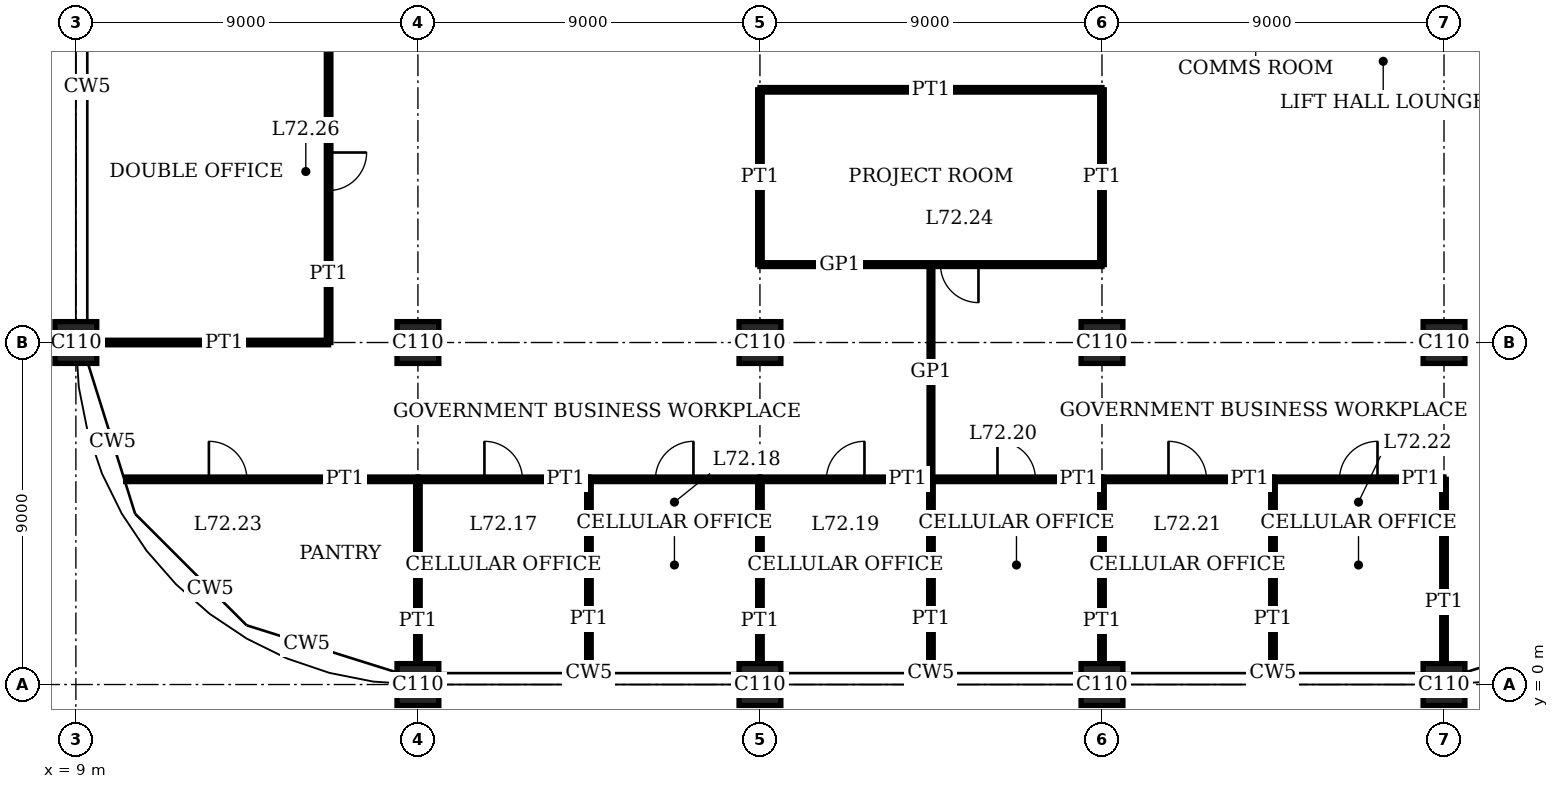
"""IFC4 building model, lengths in metres.
Left out: names, types, materials, properties, quantities, classifications, styles, units other than length and angle.
Written with IfcOpenShell. Run it as: python <this file> out.ifc"""

import sys

from ifc_helpers import new_model, si_unit, direction, frame, frame_2d, origin, origin_2d, place, context, subcontext, project, spatial, rectangle, extrude, element, fill, save


model = new_model("IFC4")
c1 = context("Model", 3, precision=1e-05, world=origin(), true_north=direction((0.0, 1.0)))
c2 = subcontext(c1, "Body", "Model", "MODEL_VIEW")
j1 = project(units=[si_unit("LENGTHUNIT", "METRE"), si_unit("PLANEANGLEUNIT", "RADIAN")], contexts=[c1])
p1 = place(None, origin())
s1 = spatial("IfcSite", under=j1, at=p1, CompositionType="ELEMENT")
p2 = place(p1, origin())
s2 = spatial("IfcBuilding", under=s1, at=p2, CompositionType="ELEMENT")
p3 = place(p2, frame((0.0, 0.0, 295.4)))
s3 = spatial("IfcBuildingStorey", under=s2, at=p3, CompositionType="ELEMENT", Elevation=295.4)
for number, where, z_axis, x_axis in (
    (1, (9.0, 9.0, 0.0), (0.0, 0.0, 1.0), (1.0, 0.0, 0.0)),
    (2, (18.0, 0.0, 0.0), (0.0, 0.0, 1.0), (1.0, 0.0, 0.0)),
    (3, (18.0, 9.0, 0.0), (0.0, 0.0, 1.0), (1.0, 0.0, 0.0)),
    (4, (27.0, 0.0, 0.0), (0.0, 0.0, 1.0), (1.0, 0.0, 0.0)),
    (5, (27.0, 9.0, 0.0), (0.0, 0.0, 1.0), (1.0, 0.0, 0.0)),
    (6, (36.0, 0.0, 0.0), (0.0, 0.0, 1.0), (1.0, 0.0, 0.0)),
    (7, (36.0, 9.0, 0.0), (0.0, 0.0, 1.0), (1.0, 0.0, 0.0)),
    (8, (45.0, 0.0, 0.0), (0.0, 0.0, 1.0), (1.0, 0.0, 0.0)),
    (9, (45.0, 9.0, 0.0), (0.0, 0.0, 1.0), (1.0, 0.0, 0.0)),
):
    element("IfcColumn", number, at=place(p3, frame(where, z_axis=z_axis, x_axis=x_axis)), inside=s3, PredefinedType="COLUMN", context=c2, shape_type="SweptSolid", body=[
        extrude(rectangle(XDim=1.1, YDim=1.1, at=origin_2d()), origin(), (0.0, 0.0, 1.0), 4.0),
    ])
p4 = place(p3, frame((18.0, 5.4, 0.0), z_axis=(0.0, 0.0, 1.0), x_axis=(1.0, 0.0, 0.0)))
e10 = element("IfcWall", 10, at=p4, inside=s3, PredefinedType="PARTITIONING", context=c2, shape_type="SweptSolid", body=[
    extrude(rectangle(XDim=4.5, YDim=0.12, at=frame_2d((2.25, 0.0))), origin(), (0.0, 0.0, 1.0), 3.75),
])
p5 = place(p4, frame((1.75, 0.0, 0.0)))
e11 = element("IfcOpeningElement", 11, at=p5, cuts=e10, PredefinedType="OPENING", context=c2, shape_type="SweptSolid", body=[
    extrude(rectangle(XDim=1.0, YDim=2.4, at=frame_2d((0.5, 1.2))), frame((0.0, 0.07, 0.0), z_axis=(0.0, -1.0, 0.0), x_axis=(1.0, 0.0, 0.0)), (0.0, 0.0, 1.0), 0.14),
])
p6 = place(p3, frame((22.5, 5.4, 0.0), z_axis=(0.0, 0.0, 1.0), x_axis=(1.0, 0.0, 0.0)))
e12 = element("IfcWall", 12, at=p6, inside=s3, PredefinedType="PARTITIONING", context=c2, shape_type="SweptSolid", body=[
    extrude(rectangle(XDim=4.5, YDim=0.12, at=frame_2d((2.25, 0.0))), origin(), (0.0, 0.0, 1.0), 3.75),
])
p7 = place(p6, frame((1.75, 0.0, 0.0)))
e13 = element("IfcOpeningElement", 13, at=p7, cuts=e12, PredefinedType="OPENING", context=c2, shape_type="SweptSolid", body=[
    extrude(rectangle(XDim=1.0, YDim=2.4, at=frame_2d((0.5, 1.2))), frame((0.0, 0.07, 0.0), z_axis=(0.0, -1.0, 0.0), x_axis=(1.0, 0.0, 0.0)), (0.0, 0.0, 1.0), 0.14),
])
p8 = place(p3, frame((27.0, 5.4, 0.0), z_axis=(0.0, 0.0, 1.0), x_axis=(1.0, 0.0, 0.0)))
e14 = element("IfcWall", 14, at=p8, inside=s3, PredefinedType="PARTITIONING", context=c2, shape_type="SweptSolid", body=[
    extrude(rectangle(XDim=4.5, YDim=0.12, at=frame_2d((2.25, 0.0))), origin(), (0.0, 0.0, 1.0), 3.75),
])
p9 = place(p8, frame((1.75, 0.0, 0.0)))
e15 = element("IfcOpeningElement", 15, at=p9, cuts=e14, PredefinedType="OPENING", context=c2, shape_type="SweptSolid", body=[
    extrude(rectangle(XDim=1.0, YDim=2.4, at=frame_2d((0.5, 1.2))), frame((0.0, 0.07, 0.0), z_axis=(0.0, -1.0, 0.0), x_axis=(1.0, 0.0, 0.0)), (0.0, 0.0, 1.0), 0.14),
])
p10 = place(p3, frame((31.5, 5.4, 0.0), z_axis=(0.0, 0.0, 1.0), x_axis=(1.0, 0.0, 0.0)))
e16 = element("IfcWall", 16, at=p10, inside=s3, PredefinedType="PARTITIONING", context=c2, shape_type="SweptSolid", body=[
    extrude(rectangle(XDim=4.5, YDim=0.12, at=frame_2d((2.25, 0.0))), origin(), (0.0, 0.0, 1.0), 3.75),
])
p11 = place(p10, frame((1.75, 0.0, 0.0)))
e17 = element("IfcOpeningElement", 17, at=p11, cuts=e16, PredefinedType="OPENING", context=c2, shape_type="SweptSolid", body=[
    extrude(rectangle(XDim=1.0, YDim=2.4, at=frame_2d((0.5, 1.2))), frame((0.0, 0.07, 0.0), z_axis=(0.0, -1.0, 0.0), x_axis=(1.0, 0.0, 0.0)), (0.0, 0.0, 1.0), 0.14),
])
p12 = place(p3, frame((36.0, 5.4, 0.0), z_axis=(0.0, 0.0, 1.0), x_axis=(1.0, 0.0, 0.0)))
e18 = element("IfcWall", 18, at=p12, inside=s3, PredefinedType="PARTITIONING", context=c2, shape_type="SweptSolid", body=[
    extrude(rectangle(XDim=4.5, YDim=0.12, at=frame_2d((2.25, 0.0))), origin(), (0.0, 0.0, 1.0), 3.75),
])
p13 = place(p12, frame((1.75, 0.0, 0.0)))
e19 = element("IfcOpeningElement", 19, at=p13, cuts=e18, PredefinedType="OPENING", context=c2, shape_type="SweptSolid", body=[
    extrude(rectangle(XDim=1.0, YDim=2.4, at=frame_2d((0.5, 1.2))), frame((0.0, 0.07, 0.0), z_axis=(0.0, -1.0, 0.0), x_axis=(1.0, 0.0, 0.0)), (0.0, 0.0, 1.0), 0.14),
])
p14 = place(p3, frame((40.5, 5.4, 0.0), z_axis=(0.0, 0.0, 1.0), x_axis=(1.0, 0.0, 0.0)))
e20 = element("IfcWall", 20, at=p14, inside=s3, PredefinedType="PARTITIONING", context=c2, shape_type="SweptSolid", body=[
    extrude(rectangle(XDim=4.5, YDim=0.12, at=frame_2d((2.25, 0.0))), origin(), (0.0, 0.0, 1.0), 3.75),
])
p15 = place(p14, frame((1.75, 0.0, 0.0)))
e21 = element("IfcOpeningElement", 21, at=p15, cuts=e20, PredefinedType="OPENING", context=c2, shape_type="SweptSolid", body=[
    extrude(rectangle(XDim=1.0, YDim=2.4, at=frame_2d((0.5, 1.2))), frame((0.0, 0.07, 0.0), z_axis=(0.0, -1.0, 0.0), x_axis=(1.0, 0.0, 0.0)), (0.0, 0.0, 1.0), 0.14),
])
p16 = place(p3, frame((10.31, 5.4, 0.0), z_axis=(0.0, 0.0, 1.0), x_axis=(1.0, 0.0, 0.0)))
e22 = element("IfcWall", 22, at=p16, inside=s3, PredefinedType="PARTITIONING", context=c2, shape_type="SweptSolid", body=[
    extrude(rectangle(XDim=7.69, YDim=0.12, at=frame_2d((3.845, 0.0))), origin(), (0.0, 0.0, 1.0), 3.75),
])
p17 = place(p16, frame((2.19, 0.0, 0.0)))
e23 = element("IfcOpeningElement", 23, at=p17, cuts=e22, PredefinedType="OPENING", context=c2, shape_type="SweptSolid", body=[
    extrude(rectangle(XDim=1.0, YDim=2.4, at=frame_2d((0.5, 1.2))), frame((0.0, 0.07, 0.0), z_axis=(0.0, -1.0, 0.0), x_axis=(1.0, 0.0, 0.0)), (0.0, 0.0, 1.0), 0.14),
])
p18 = place(p3, frame((9.55, 9.0, 0.0), z_axis=(0.0, 0.0, 1.0), x_axis=(1.0, 0.0, 0.0)))
e24 = element("IfcWall", 24, at=p18, inside=s3, PredefinedType="PARTITIONING", context=c2, shape_type="SweptSolid", body=[
    extrude(rectangle(XDim=6.1, YDim=0.12, at=frame_2d((3.05, 0.0))), origin(), (0.0, 0.0, 1.0), 3.05),
])
p19 = place(p3, frame((27.0, 11.05, 0.0), z_axis=(0.0, 0.0, 1.0), x_axis=(1.0, 0.0, 0.0)))
e25 = element("IfcWall", 25, at=p19, inside=s3, PredefinedType="PARTITIONING", context=c2, shape_type="SweptSolid", body=[
    extrude(rectangle(XDim=9.0, YDim=0.1, at=frame_2d((4.5, 0.0))), origin(), (0.0, 0.0, 1.0), 3.75),
])
p20 = place(p19, frame((4.75, 0.0, 0.0)))
e26 = element("IfcOpeningElement", 26, at=p20, cuts=e25, PredefinedType="OPENING", context=c2, shape_type="SweptSolid", body=[
    extrude(rectangle(XDim=1.0, YDim=2.4, at=frame_2d((0.5, 1.2))), frame((0.0, 0.06, 0.0), z_axis=(0.0, -1.0, 0.0), x_axis=(1.0, 0.0, 0.0)), (0.0, 0.0, 1.0), 0.12),
])
p21 = place(p3, frame((27.0, 15.65, 0.0), z_axis=(0.0, 0.0, 1.0), x_axis=(1.0, 0.0, 0.0)))
e27 = element("IfcWall", 27, at=p21, inside=s3, PredefinedType="PARTITIONING", context=c2, shape_type="SweptSolid", body=[
    extrude(rectangle(XDim=9.0, YDim=0.12, at=frame_2d((4.5, 0.0))), origin(), (0.0, 0.0, 1.0), 3.75),
])
p22 = place(p3, frame((15.65, 9.0, 0.0), z_axis=(0.0, 0.0, 1.0), x_axis=(0.0, 1.0, 0.0)))
e28 = element("IfcWall", 28, at=p22, inside=s3, PredefinedType="PARTITIONING", context=c2, shape_type="SweptSolid", body=[
    extrude(rectangle(XDim=9.0, YDim=0.12, at=frame_2d((4.5, 0.0))), origin(), (0.0, 0.0, 1.0), 3.75),
])
p23 = place(p22, frame((4.0, 0.0, 0.0)))
e29 = element("IfcOpeningElement", 29, at=p23, cuts=e28, PredefinedType="OPENING", context=c2, shape_type="SweptSolid", body=[
    extrude(rectangle(XDim=1.0, YDim=2.4, at=frame_2d((0.5, 1.2))), frame((0.0, 0.07, 0.0), z_axis=(0.0, -1.0, 0.0), x_axis=(1.0, 0.0, 0.0)), (0.0, 0.0, 1.0), 0.14),
])
p24 = place(p3, frame((18.0, 0.55, 0.0), z_axis=(0.0, 0.0, 1.0), x_axis=(0.0, 1.0, 0.0)))
e30 = element("IfcWall", 30, at=p24, inside=s3, PredefinedType="PARTITIONING", context=c2, shape_type="SweptSolid", body=[
    extrude(rectangle(XDim=4.85, YDim=0.12, at=frame_2d((2.425, 0.0))), origin(), (0.0, 0.0, 1.0), 3.05),
])
p25 = place(p3, frame((22.5, 0.31, 0.0), z_axis=(0.0, 0.0, 1.0), x_axis=(0.0, 1.0, 0.0)))
e31 = element("IfcWall", 31, at=p25, inside=s3, PredefinedType="PARTITIONING", context=c2, shape_type="SweptSolid", body=[
    extrude(rectangle(XDim=5.09, YDim=0.12, at=frame_2d((2.545, 0.0))), origin(), (0.0, 0.0, 1.0), 3.75),
])
p26 = place(p3, frame((27.0, 0.55, 0.0), z_axis=(0.0, 0.0, 1.0), x_axis=(0.0, 1.0, 0.0)))
e32 = element("IfcWall", 32, at=p26, inside=s3, PredefinedType="PARTITIONING", context=c2, shape_type="SweptSolid", body=[
    extrude(rectangle(XDim=4.85, YDim=0.12, at=frame_2d((2.425, 0.0))), origin(), (0.0, 0.0, 1.0), 3.05),
])
p27 = place(p3, frame((27.0, 11.05, 0.0), z_axis=(0.0, 0.0, 1.0), x_axis=(0.0, 1.0, 0.0)))
e33 = element("IfcWall", 33, at=p27, inside=s3, PredefinedType="PARTITIONING", context=c2, shape_type="SweptSolid", body=[
    extrude(rectangle(XDim=4.6, YDim=0.12, at=frame_2d((2.3, 0.0))), origin(), (0.0, 0.0, 1.0), 3.05),
])
p28 = place(p3, frame((31.5, 0.31, 0.0), z_axis=(0.0, 0.0, 1.0), x_axis=(0.0, 1.0, 0.0)))
e34 = element("IfcWall", 34, at=p28, inside=s3, PredefinedType="PARTITIONING", context=c2, shape_type="SweptSolid", body=[
    extrude(rectangle(XDim=5.09, YDim=0.12, at=frame_2d((2.545, 0.0))), origin(), (0.0, 0.0, 1.0), 3.75),
])
p29 = place(p3, frame((31.5, 5.4, 0.0), z_axis=(0.0, 0.0, 1.0), x_axis=(0.0, 1.0, 0.0)))
e35 = element("IfcWall", 35, at=p29, inside=s3, PredefinedType="PARTITIONING", context=c2, shape_type="SweptSolid", body=[
    extrude(rectangle(XDim=5.66, YDim=0.1, at=frame_2d((2.83, 0.0))), origin(), (0.0, 0.0, 1.0), 3.75),
])
p30 = place(p3, frame((36.0, 0.55, 0.0), z_axis=(0.0, 0.0, 1.0), x_axis=(0.0, 1.0, 0.0)))
e36 = element("IfcWall", 36, at=p30, inside=s3, PredefinedType="PARTITIONING", context=c2, shape_type="SweptSolid", body=[
    extrude(rectangle(XDim=4.85, YDim=0.12, at=frame_2d((2.425, 0.0))), origin(), (0.0, 0.0, 1.0), 3.05),
])
p31 = place(p3, frame((36.0, 11.05, 0.0), z_axis=(0.0, 0.0, 1.0), x_axis=(0.0, 1.0, 0.0)))
e37 = element("IfcWall", 37, at=p31, inside=s3, PredefinedType="PARTITIONING", context=c2, shape_type="SweptSolid", body=[
    extrude(rectangle(XDim=4.6, YDim=0.12, at=frame_2d((2.3, 0.0))), origin(), (0.0, 0.0, 1.0), 3.05),
])
p32 = place(p3, frame((40.5, 0.31, 0.0), z_axis=(0.0, 0.0, 1.0), x_axis=(0.0, 1.0, 0.0)))
e38 = element("IfcWall", 38, at=p32, inside=s3, PredefinedType="PARTITIONING", context=c2, shape_type="SweptSolid", body=[
    extrude(rectangle(XDim=5.09, YDim=0.12, at=frame_2d((2.545, 0.0))), origin(), (0.0, 0.0, 1.0), 3.75),
])
p33 = place(p3, frame((45.0, 0.55, 0.0), z_axis=(0.0, 0.0, 1.0), x_axis=(0.0, 1.0, 0.0)))
e39 = element("IfcWall", 39, at=p33, inside=s3, PredefinedType="PARTITIONING", context=c2, shape_type="SweptSolid", body=[
    extrude(rectangle(XDim=4.85, YDim=0.12, at=frame_2d((2.425, 0.0))), origin(), (0.0, 0.0, 1.0), 3.05),
])
p34 = place(p5, origin())
e40 = element("IfcDoor", 40, at=p34, inside=s3, OperationType="SINGLE_SWING_RIGHT", PredefinedType="DOOR", context=c2, shape_type="SweptSolid", body=[
    extrude(rectangle(XDim=1.0, YDim=2.4, at=frame_2d((0.5, 1.2))), frame((0.0, 0.025, 0.0), z_axis=(0.0, -1.0, 0.0), x_axis=(1.0, 0.0, 0.0)), (0.0, 0.0, 1.0), 0.05),
])
fill(e11, e40)
p35 = place(p7, origin())
e41 = element("IfcDoor", 41, at=p35, inside=s3, OperationType="SINGLE_SWING_LEFT", PredefinedType="DOOR", context=c2, shape_type="SweptSolid", body=[
    extrude(rectangle(XDim=1.0, YDim=2.4, at=frame_2d((0.5, 1.2))), frame((0.0, 0.025, 0.0), z_axis=(0.0, -1.0, 0.0), x_axis=(1.0, 0.0, 0.0)), (0.0, 0.0, 1.0), 0.05),
])
fill(e13, e41)
p36 = place(p9, origin())
e42 = element("IfcDoor", 42, at=p36, inside=s3, OperationType="SINGLE_SWING_LEFT", PredefinedType="DOOR", context=c2, shape_type="SweptSolid", body=[
    extrude(rectangle(XDim=1.0, YDim=2.4, at=frame_2d((0.5, 1.2))), frame((0.0, 0.025, 0.0), z_axis=(0.0, -1.0, 0.0), x_axis=(1.0, 0.0, 0.0)), (0.0, 0.0, 1.0), 0.05),
])
fill(e15, e42)
p37 = place(p11, origin())
e43 = element("IfcDoor", 43, at=p37, inside=s3, OperationType="SINGLE_SWING_RIGHT", PredefinedType="DOOR", context=c2, shape_type="SweptSolid", body=[
    extrude(rectangle(XDim=1.0, YDim=2.4, at=frame_2d((0.5, 1.2))), frame((0.0, 0.025, 0.0), z_axis=(0.0, -1.0, 0.0), x_axis=(1.0, 0.0, 0.0)), (0.0, 0.0, 1.0), 0.05),
])
fill(e17, e43)
p38 = place(p13, origin())
e44 = element("IfcDoor", 44, at=p38, inside=s3, OperationType="SINGLE_SWING_RIGHT", PredefinedType="DOOR", context=c2, shape_type="SweptSolid", body=[
    extrude(rectangle(XDim=1.0, YDim=2.4, at=frame_2d((0.5, 1.2))), frame((0.0, 0.025, 0.0), z_axis=(0.0, -1.0, 0.0), x_axis=(1.0, 0.0, 0.0)), (0.0, 0.0, 1.0), 0.05),
])
fill(e19, e44)
p39 = place(p15, origin())
e45 = element("IfcDoor", 45, at=p39, inside=s3, OperationType="SINGLE_SWING_LEFT", PredefinedType="DOOR", context=c2, shape_type="SweptSolid", body=[
    extrude(rectangle(XDim=1.0, YDim=2.4, at=frame_2d((0.5, 1.2))), frame((0.0, 0.025, 0.0), z_axis=(0.0, -1.0, 0.0), x_axis=(1.0, 0.0, 0.0)), (0.0, 0.0, 1.0), 0.05),
])
fill(e21, e45)
p40 = place(p17, origin())
e46 = element("IfcDoor", 46, at=p40, inside=s3, OperationType="SINGLE_SWING_RIGHT", PredefinedType="DOOR", context=c2, shape_type="SweptSolid", body=[
    extrude(rectangle(XDim=1.0, YDim=2.4, at=frame_2d((0.5, 1.2))), frame((0.0, 0.025, 0.0), z_axis=(0.0, -1.0, 0.0), x_axis=(1.0, 0.0, 0.0)), (0.0, 0.0, 1.0), 0.05),
])
fill(e23, e46)
p41 = place(p20, origin())
e47 = element("IfcDoor", 47, at=p41, inside=s3, OperationType="SINGLE_SWING_RIGHT", PredefinedType="DOOR", context=c2, shape_type="SweptSolid", body=[
    extrude(rectangle(XDim=1.0, YDim=2.4, at=frame_2d((0.5, 1.2))), frame((0.0, 0.02, 0.0), z_axis=(0.0, -1.0, 0.0), x_axis=(1.0, 0.0, 0.0)), (0.0, 0.0, 1.0), 0.04),
])
fill(e26, e47)
p42 = place(p23, origin())
e48 = element("IfcDoor", 48, at=p42, inside=s3, OperationType="SINGLE_SWING_RIGHT", PredefinedType="DOOR", context=c2, shape_type="SweptSolid", body=[
    extrude(rectangle(XDim=1.0, YDim=2.4, at=frame_2d((0.5, 1.2))), frame((0.0, 0.025, 0.0), z_axis=(0.0, -1.0, 0.0), x_axis=(1.0, 0.0, 0.0)), (0.0, 0.0, 1.0), 0.05),
])
fill(e29, e48)
save(model, sys.argv[1])
